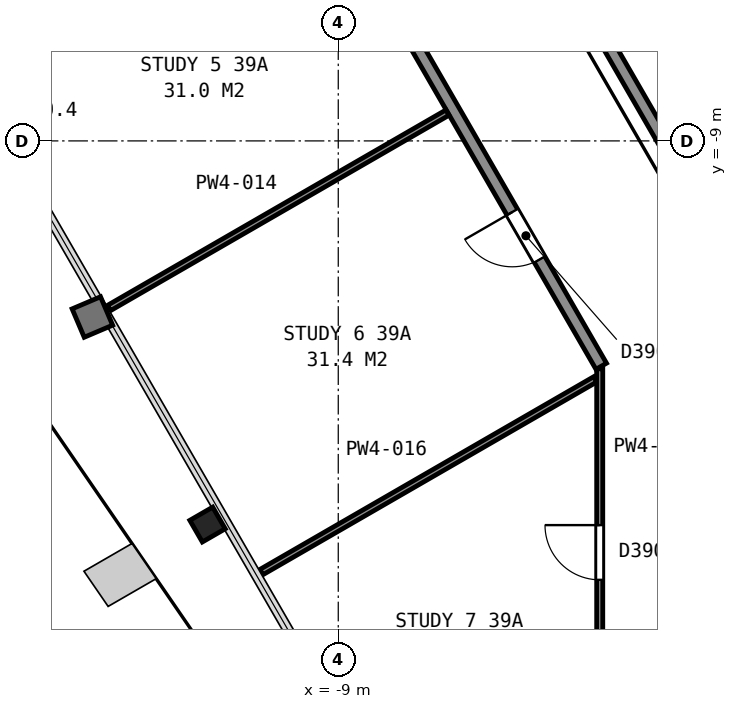
"""IFC4 building model, lengths in metres.
Left out: names, types, materials, properties, quantities, classifications, styles, units other than length and angle.
Written with IfcOpenShell. Run it as: python <this file> out.ifc"""

import sys

from ifc_helpers import new_model, si_unit, direction, frame, frame_2d, origin, origin_2d, place, context, subcontext, project, spatial, rectangle, i_section, extrude, element, fill, save


model = new_model("IFC4")
c1 = context("Model", 3, precision=1e-05, world=origin(), true_north=direction((0.0, 1.0)))
c2 = subcontext(c1, "Body", "Model", "MODEL_VIEW")
j1 = project(units=[si_unit("LENGTHUNIT", "METRE"), si_unit("PLANEANGLEUNIT", "RADIAN")], contexts=[c1])
p1 = place(None, origin())
s1 = spatial("IfcSite", under=j1, at=p1, CompositionType="ELEMENT")
p2 = place(p1, origin())
s2 = spatial("IfcBuilding", under=s1, at=p2, CompositionType="ELEMENT")
p3 = place(p2, frame((0.0, 0.0, 159.9)))
s3 = spatial("IfcBuildingStorey", under=s2, at=p3, CompositionType="ELEMENT", Elevation=159.9)
p4 = place(p3, frame((-11.15, -15.31, 0.035), z_axis=(0.0, 0.0, 1.0), x_axis=(-0.5, 0.866025403784, 0.0)))
e1 = element("IfcColumn", 1, at=p4, inside=s3, PredefinedType="COLUMN", context=c2, shape_type="SweptSolid", body=[
    extrude(i_section(OverallWidth=0.411, OverallDepth=0.434, WebThickness=0.036, FlangeThickness=0.057, FilletRadius=0.015, at=origin_2d()), origin(), (0.0, 0.0, 1.0), 3.665),
])
p5 = place(p3, frame((-4.655, -7.257, 0.0), z_axis=(0.0, 0.0, 1.0), x_axis=(0.499966124405, -0.866044960985, 0.0)))
e2 = element("IfcWall", 2, at=p5, inside=s3, PredefinedType="PARTITIONING", context=c2, shape_type="SweptSolid", body=[
    extrude(rectangle(XDim=5.956, YDim=0.2, at=frame_2d((2.978, 0.0))), origin(), (0.0, 0.0, 1.0), 3.45),
])
p6 = place(p3, frame((-4.675, -12.706, 0.0), z_axis=(0.0, 0.0, 1.0), x_axis=(-0.499972470324, 0.866041297467, 0.0)))
e3 = element("IfcWall", 3, at=p6, inside=s3, PredefinedType="PARTITIONING", context=c2, shape_type="SweptSolid", body=[
    extrude(rectangle(XDim=17.385, YDim=0.2, at=frame_2d((8.692, 0.0))), origin(), (0.0, 0.0, 1.0), 2.713),
])
p7 = place(p6, frame((15.435, 0.0, 0.0)))
e4 = element("IfcOpeningElement", 4, at=p7, cuts=e3, PredefinedType="OPENING", context=c2, shape_type="SweptSolid", body=[
    extrude(rectangle(XDim=0.9, YDim=2.1, at=frame_2d((0.45, 1.05))), frame((0.0, 0.11, 0.0), z_axis=(0.0, -1.0, 0.0), x_axis=(1.0, 0.0, 0.0)), (0.0, 0.0, 1.0), 0.22),
])
p8 = place(p6, frame((12.835, 0.0, 0.0)))
e5 = element("IfcOpeningElement", 5, at=p8, cuts=e3, PredefinedType="OPENING", context=c2, shape_type="SweptSolid", body=[
    extrude(rectangle(XDim=0.9, YDim=2.1, at=frame_2d((0.45, 1.05))), frame((0.0, 0.11, 0.0), z_axis=(0.0, -1.0, 0.0), x_axis=(1.0, 0.0, 0.0)), (0.0, 0.0, 1.0), 0.22),
])
p9 = place(p6, frame((6.941, 0.0, 0.0)))
e6 = element("IfcOpeningElement", 6, at=p9, cuts=e3, PredefinedType="OPENING", context=c2, shape_type="SweptSolid", body=[
    extrude(rectangle(XDim=0.9, YDim=2.1, at=frame_2d((0.45, 1.05))), frame((0.0, 0.11, 0.0), z_axis=(0.0, -1.0, 0.0), x_axis=(1.0, 0.0, 0.0)), (0.0, 0.0, 1.0), 0.22),
])
p10 = place(p6, frame((2.028, 0.0, 0.0)))
e7 = element("IfcOpeningElement", 7, at=p10, cuts=e3, PredefinedType="OPENING", context=c2, shape_type="SweptSolid", body=[
    extrude(rectangle(XDim=0.9, YDim=2.1, at=frame_2d((0.45, 1.05))), frame((0.0, 0.11, 0.0), z_axis=(0.0, -1.0, 0.0), x_axis=(1.0, 0.0, 0.0)), (0.0, 0.0, 1.0), 0.22),
])
p11 = place(p3, frame((-12.772, -11.749, 0.0), z_axis=(0.0, 0.0, 1.0), x_axis=(0.866026229868, 0.499998569178, 0.0)))
e8 = element("IfcWall", 8, at=p11, inside=s3, PredefinedType="PARTITIONING", context=c2, shape_type="SweptSolid", body=[
    extrude(rectangle(XDim=6.429, YDim=0.1, at=frame_2d((3.215, 0.0))), origin(), (0.0, 0.0, 1.0), 2.713),
])
p12 = place(p3, frame((-10.264, -16.092, 0.0), z_axis=(0.0, 0.0, 1.0), x_axis=(0.86602074738, 0.500008065043, 0.0)))
e9 = element("IfcWall", 9, at=p12, inside=s3, PredefinedType="PARTITIONING", context=c2, shape_type="SweptSolid", body=[
    extrude(rectangle(XDim=6.339, YDim=0.1, at=frame_2d((3.169, 0.0))), origin(), (0.0, 0.0, 1.0), 2.713),
])
p13 = place(p3, frame((-4.7, -18.669, 0.0), z_axis=(0.0, 0.0, 1.0), x_axis=(0.0, 1.0, 0.0)))
e10 = element("IfcWall", 10, at=p13, inside=s3, PredefinedType="PARTITIONING", context=c2, shape_type="SweptSolid", body=[
    extrude(rectangle(XDim=5.921, YDim=0.1, at=frame_2d((2.96, 0.0))), origin(), (0.0, 0.0, 1.0), 2.713),
])
p14 = place(p13, frame((2.45, 0.0, 0.0)))
e11 = element("IfcOpeningElement", 11, at=p14, cuts=e10, PredefinedType="OPENING", context=c2, shape_type="SweptSolid", body=[
    extrude(rectangle(XDim=0.9, YDim=2.1, at=frame_2d((0.45, 1.05))), frame((0.0, 0.06, 0.0), z_axis=(0.0, -1.0, 0.0), x_axis=(1.0, 0.0, 0.0)), (0.0, 0.0, 1.0), 0.12),
])
p15 = place(p10, origin())
e12 = element("IfcDoor", 12, at=p15, inside=s3, OperationType="SINGLE_SWING_RIGHT", PredefinedType="DOOR", context=c2, shape_type="SweptSolid", body=[
    extrude(rectangle(XDim=0.9, YDim=2.1, at=frame_2d((0.45, 1.05))), frame((0.0, 0.025, 0.0), z_axis=(0.0, -1.0, 0.0), x_axis=(1.0, 0.0, 0.0)), (0.0, 0.0, 1.0), 0.05),
])
fill(e7, e12)
p16 = place(p14, origin())
e13 = element("IfcDoor", 13, at=p16, inside=s3, OperationType="SINGLE_SWING_RIGHT", PredefinedType="DOOR", context=c2, shape_type="SweptSolid", body=[
    extrude(rectangle(XDim=0.9, YDim=2.1, at=frame_2d((0.45, 1.05))), frame((0.0, 0.025, 0.0), z_axis=(0.0, -1.0, 0.0), x_axis=(1.0, 0.0, 0.0)), (0.0, 0.0, 1.0), 0.05),
])
fill(e11, e13)
save(model, sys.argv[1])
